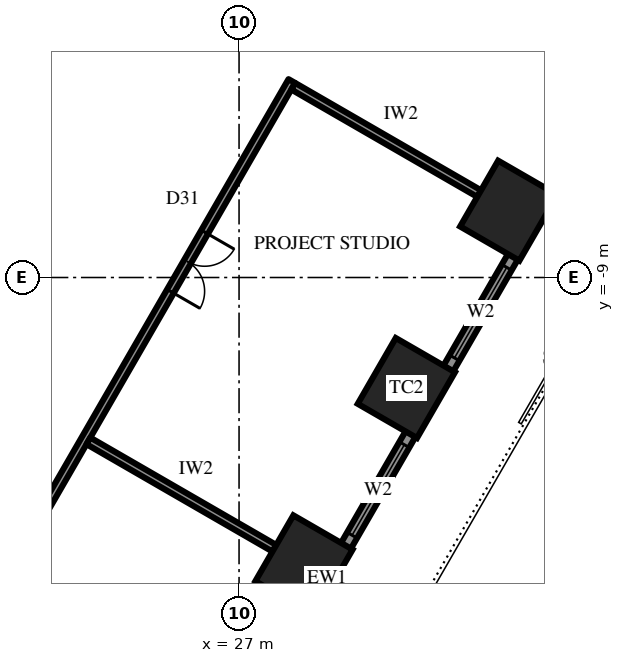
"""IFC4 building model, lengths in metres.
Left out: names, types, materials, properties, quantities, classifications, styles, units other than length and angle.
Written with IfcOpenShell. Run it as: python <this file> out.ifc"""

import sys

from ifc_helpers import new_model, si_unit, direction, frame, frame_2d, origin, origin_2d, place, context, subcontext, project, spatial, rectangle, extrude, element, fill, save


model = new_model("IFC4")
c1 = context("Model", 3, precision=1e-05, world=origin(), true_north=direction((0.0, 1.0)))
c2 = subcontext(c1, "Body", "Model", "MODEL_VIEW")
j1 = project(units=[si_unit("LENGTHUNIT", "METRE"), si_unit("PLANEANGLEUNIT", "RADIAN")], contexts=[c1])
p1 = place(None, origin())
s1 = spatial("IfcSite", under=j1, at=p1, CompositionType="ELEMENT")
p2 = place(p1, origin())
s2 = spatial("IfcBuilding", under=s1, at=p2, CompositionType="ELEMENT")
p3 = place(p2, frame((0.0, 0.0, 57.1)))
s3 = spatial("IfcBuildingStorey", under=s2, at=p3, CompositionType="ELEMENT", Elevation=57.1)
for number, where, z_axis, x_axis in (
    (1, (28.709, -16.575, 0.0), (0.0, 0.0, 1.0), (0.5, 0.866, 0.0)),
    (2, (31.403, -11.908, 0.0), (0.0, 0.0, 1.0), (0.5, 0.866, 0.0)),
    (3, (34.097, -7.242, 0.0), (0.0, 0.0, 1.0), (0.5, 0.866, 0.0)),
):
    element("IfcColumn", number, at=place(p3, frame(where, z_axis=z_axis, x_axis=x_axis)), inside=s3, PredefinedType="COLUMN", context=c2, shape_type="SweptSolid", body=[
        extrude(rectangle(XDim=2.0, YDim=1.8, at=origin_2d()), origin(), (0.0, 0.0, 1.0), 4.2),
    ])
p4 = place(p3, frame((21.232, -30.925, 0.0), z_axis=(0.0, 0.0, 1.0), x_axis=(0.499999163675, 0.866025886636, 0.0)))
e4 = element("IfcWall", 4, at=p4, inside=s3, PredefinedType="SOLIDWALL", context=c2, shape_type="SweptSolid", body=[
    extrude(rectangle(XDim=32.332, YDim=0.3, at=frame_2d((16.166, 0.0))), origin(), (0.0, 0.0, 1.0), 2.7),
])
p5 = place(p4, frame((1.319, 0.0, 0.6)))
e5 = element("IfcOpeningElement", 5, at=p5, cuts=e4, PredefinedType="OPENING", context=c2, shape_type="SweptSolid", body=[
    extrude(rectangle(XDim=2.75, YDim=1.85, at=frame_2d((1.375, 0.925))), frame((0.0, 0.16, 0.0), z_axis=(0.0, -1.0, 0.0), x_axis=(1.0, 0.0, 0.0)), (0.0, 0.0, 1.0), 0.32),
])
p6 = place(p4, frame((6.708, 0.0, 0.6)))
e6 = element("IfcOpeningElement", 6, at=p6, cuts=e4, PredefinedType="OPENING", context=c2, shape_type="SweptSolid", body=[
    extrude(rectangle(XDim=2.75, YDim=1.85, at=frame_2d((1.375, 0.925))), frame((0.0, 0.16, 0.0), z_axis=(0.0, -1.0, 0.0), x_axis=(1.0, 0.0, 0.0)), (0.0, 0.0, 1.0), 0.32),
])
p7 = place(p4, frame((12.872, 0.0, 0.0)))
e7 = element("IfcOpeningElement", 7, at=p7, cuts=e4, PredefinedType="OPENING", context=c2, shape_type="SweptSolid", body=[
    extrude(rectangle(XDim=1.2, YDim=2.4, at=frame_2d((0.6, 1.2))), frame((0.0, 0.16, 0.0), z_axis=(0.0, -1.0, 0.0), x_axis=(1.0, 0.0, 0.0)), (0.0, 0.0, 1.0), 0.32),
])
p8 = place(p4, frame((17.485, 0.0, 0.6)))
e8 = element("IfcOpeningElement", 8, at=p8, cuts=e4, PredefinedType="OPENING", context=c2, shape_type="SweptSolid", body=[
    extrude(rectangle(XDim=2.75, YDim=1.85, at=frame_2d((1.375, 0.925))), frame((0.0, 0.16, 0.0), z_axis=(0.0, -1.0, 0.0), x_axis=(1.0, 0.0, 0.0)), (0.0, 0.0, 1.0), 0.32),
])
p9 = place(p4, frame((22.874, 0.0, 0.6)))
e9 = element("IfcOpeningElement", 9, at=p9, cuts=e4, PredefinedType="OPENING", context=c2, shape_type="SweptSolid", body=[
    extrude(rectangle(XDim=2.75, YDim=1.85, at=frame_2d((1.375, 0.925))), frame((0.0, 0.16, 0.0), z_axis=(0.0, -1.0, 0.0), x_axis=(1.0, 0.0, 0.0)), (0.0, 0.0, 1.0), 0.32),
])
p10 = place(p4, frame((28.262, 0.0, 0.6)))
e10 = element("IfcOpeningElement", 10, at=p10, cuts=e4, PredefinedType="OPENING", context=c2, shape_type="SweptSolid", body=[
    extrude(rectangle(XDim=2.75, YDim=1.85, at=frame_2d((1.375, 0.925))), frame((0.0, 0.16, 0.0), z_axis=(0.0, -1.0, 0.0), x_axis=(1.0, 0.0, 0.0)), (0.0, 0.0, 1.0), 0.32),
])
p11 = place(p3, frame((17.511, -22.67, 0.0), z_axis=(0.0, 0.0, 1.0), x_axis=(0.500000289772, 0.866025236485, 0.0)))
e11 = element("IfcWall", 11, at=p11, inside=s3, PredefinedType="PARTITIONING", context=c2, shape_type="SweptSolid", body=[
    extrude(rectangle(XDim=21.754, YDim=0.2, at=frame_2d((10.877, 0.0))), origin(), (0.0, 0.0, 1.0), 4.0),
])
p12 = place(p11, frame((4.589, 0.0, 0.0)))
e12 = element("IfcOpeningElement", 12, at=p12, cuts=e11, PredefinedType="OPENING", context=c2, shape_type="SweptSolid", body=[
    extrude(rectangle(XDim=1.8, YDim=2.4, at=frame_2d((0.9, 1.2))), frame((0.0, 0.11, 0.0), z_axis=(0.0, -1.0, 0.0), x_axis=(1.0, 0.0, 0.0)), (0.0, 0.0, 1.0), 0.22),
])
p13 = place(p11, frame((15.366, 0.0, 0.0)))
e13 = element("IfcOpeningElement", 13, at=p13, cuts=e11, PredefinedType="OPENING", context=c2, shape_type="SweptSolid", body=[
    extrude(rectangle(XDim=1.8, YDim=2.4, at=frame_2d((0.9, 1.2))), frame((0.0, 0.11, 0.0), z_axis=(0.0, -1.0, 0.0), x_axis=(1.0, 0.0, 0.0)), (0.0, 0.0, 1.0), 0.22),
])
p14 = place(p3, frame((23.036, -13.3, 0.0), z_axis=(0.0, 0.0, 1.0), x_axis=(0.866019355129, -0.500010476433, 0.0)))
e14 = element("IfcWall", 14, at=p14, inside=s3, PredefinedType="PARTITIONING", context=c2, shape_type="SweptSolid", body=[
    extrude(rectangle(XDim=5.65, YDim=0.2, at=frame_2d((2.825, 0.0))), origin(), (0.0, 0.0, 1.0), 4.0),
])
p15 = place(p3, frame((28.425, -3.967, 0.0), z_axis=(0.0, 0.0, 1.0), x_axis=(0.866011447264, -0.500024172624, 0.0)))
e15 = element("IfcWall", 15, at=p15, inside=s3, PredefinedType="PARTITIONING", context=c2, shape_type="SweptSolid", body=[
    extrude(rectangle(XDim=5.65, YDim=0.2, at=frame_2d((2.825, 0.0))), origin(), (0.0, 0.0, 1.0), 2.944),
])
p16 = place(p8, origin())
e16 = element("IfcWindow", 16, at=p16, inside=s3, PartitioningType="SINGLE_PANEL", PredefinedType="WINDOW", context=c2, shape_type="SweptSolid", body=[
    extrude(rectangle(XDim=2.75, YDim=1.85, at=frame_2d((1.375, 0.925))), frame((0.0, 0.03, 0.0), z_axis=(0.0, -1.0, 0.0), x_axis=(1.0, 0.0, 0.0)), (0.0, 0.0, 1.0), 0.06),
])
fill(e8, e16)
p17 = place(p9, origin())
e17 = element("IfcWindow", 17, at=p17, inside=s3, PartitioningType="SINGLE_PANEL", PredefinedType="WINDOW", context=c2, shape_type="SweptSolid", body=[
    extrude(rectangle(XDim=2.75, YDim=1.85, at=frame_2d((1.375, 0.925))), frame((0.0, 0.03, 0.0), z_axis=(0.0, -1.0, 0.0), x_axis=(1.0, 0.0, 0.0)), (0.0, 0.0, 1.0), 0.06),
])
fill(e9, e17)
p18 = place(p13, frame((1.8, 0.0, 0.0), z_axis=(0.0, 0.0, 1.0), x_axis=(-1.0, 0.0, 0.0)))
e18 = element("IfcDoor", 18, at=p18, inside=s3, OperationType="DOUBLE_DOOR_SINGLE_SWING", PredefinedType="DOOR", context=c2, shape_type="SweptSolid", body=[
    extrude(rectangle(XDim=1.8, YDim=2.4, at=frame_2d((0.9, 1.2))), frame((0.0, 0.025, 0.0), z_axis=(0.0, -1.0, 0.0), x_axis=(1.0, 0.0, 0.0)), (0.0, 0.0, 1.0), 0.05),
])
fill(e13, e18)
save(model, sys.argv[1])
